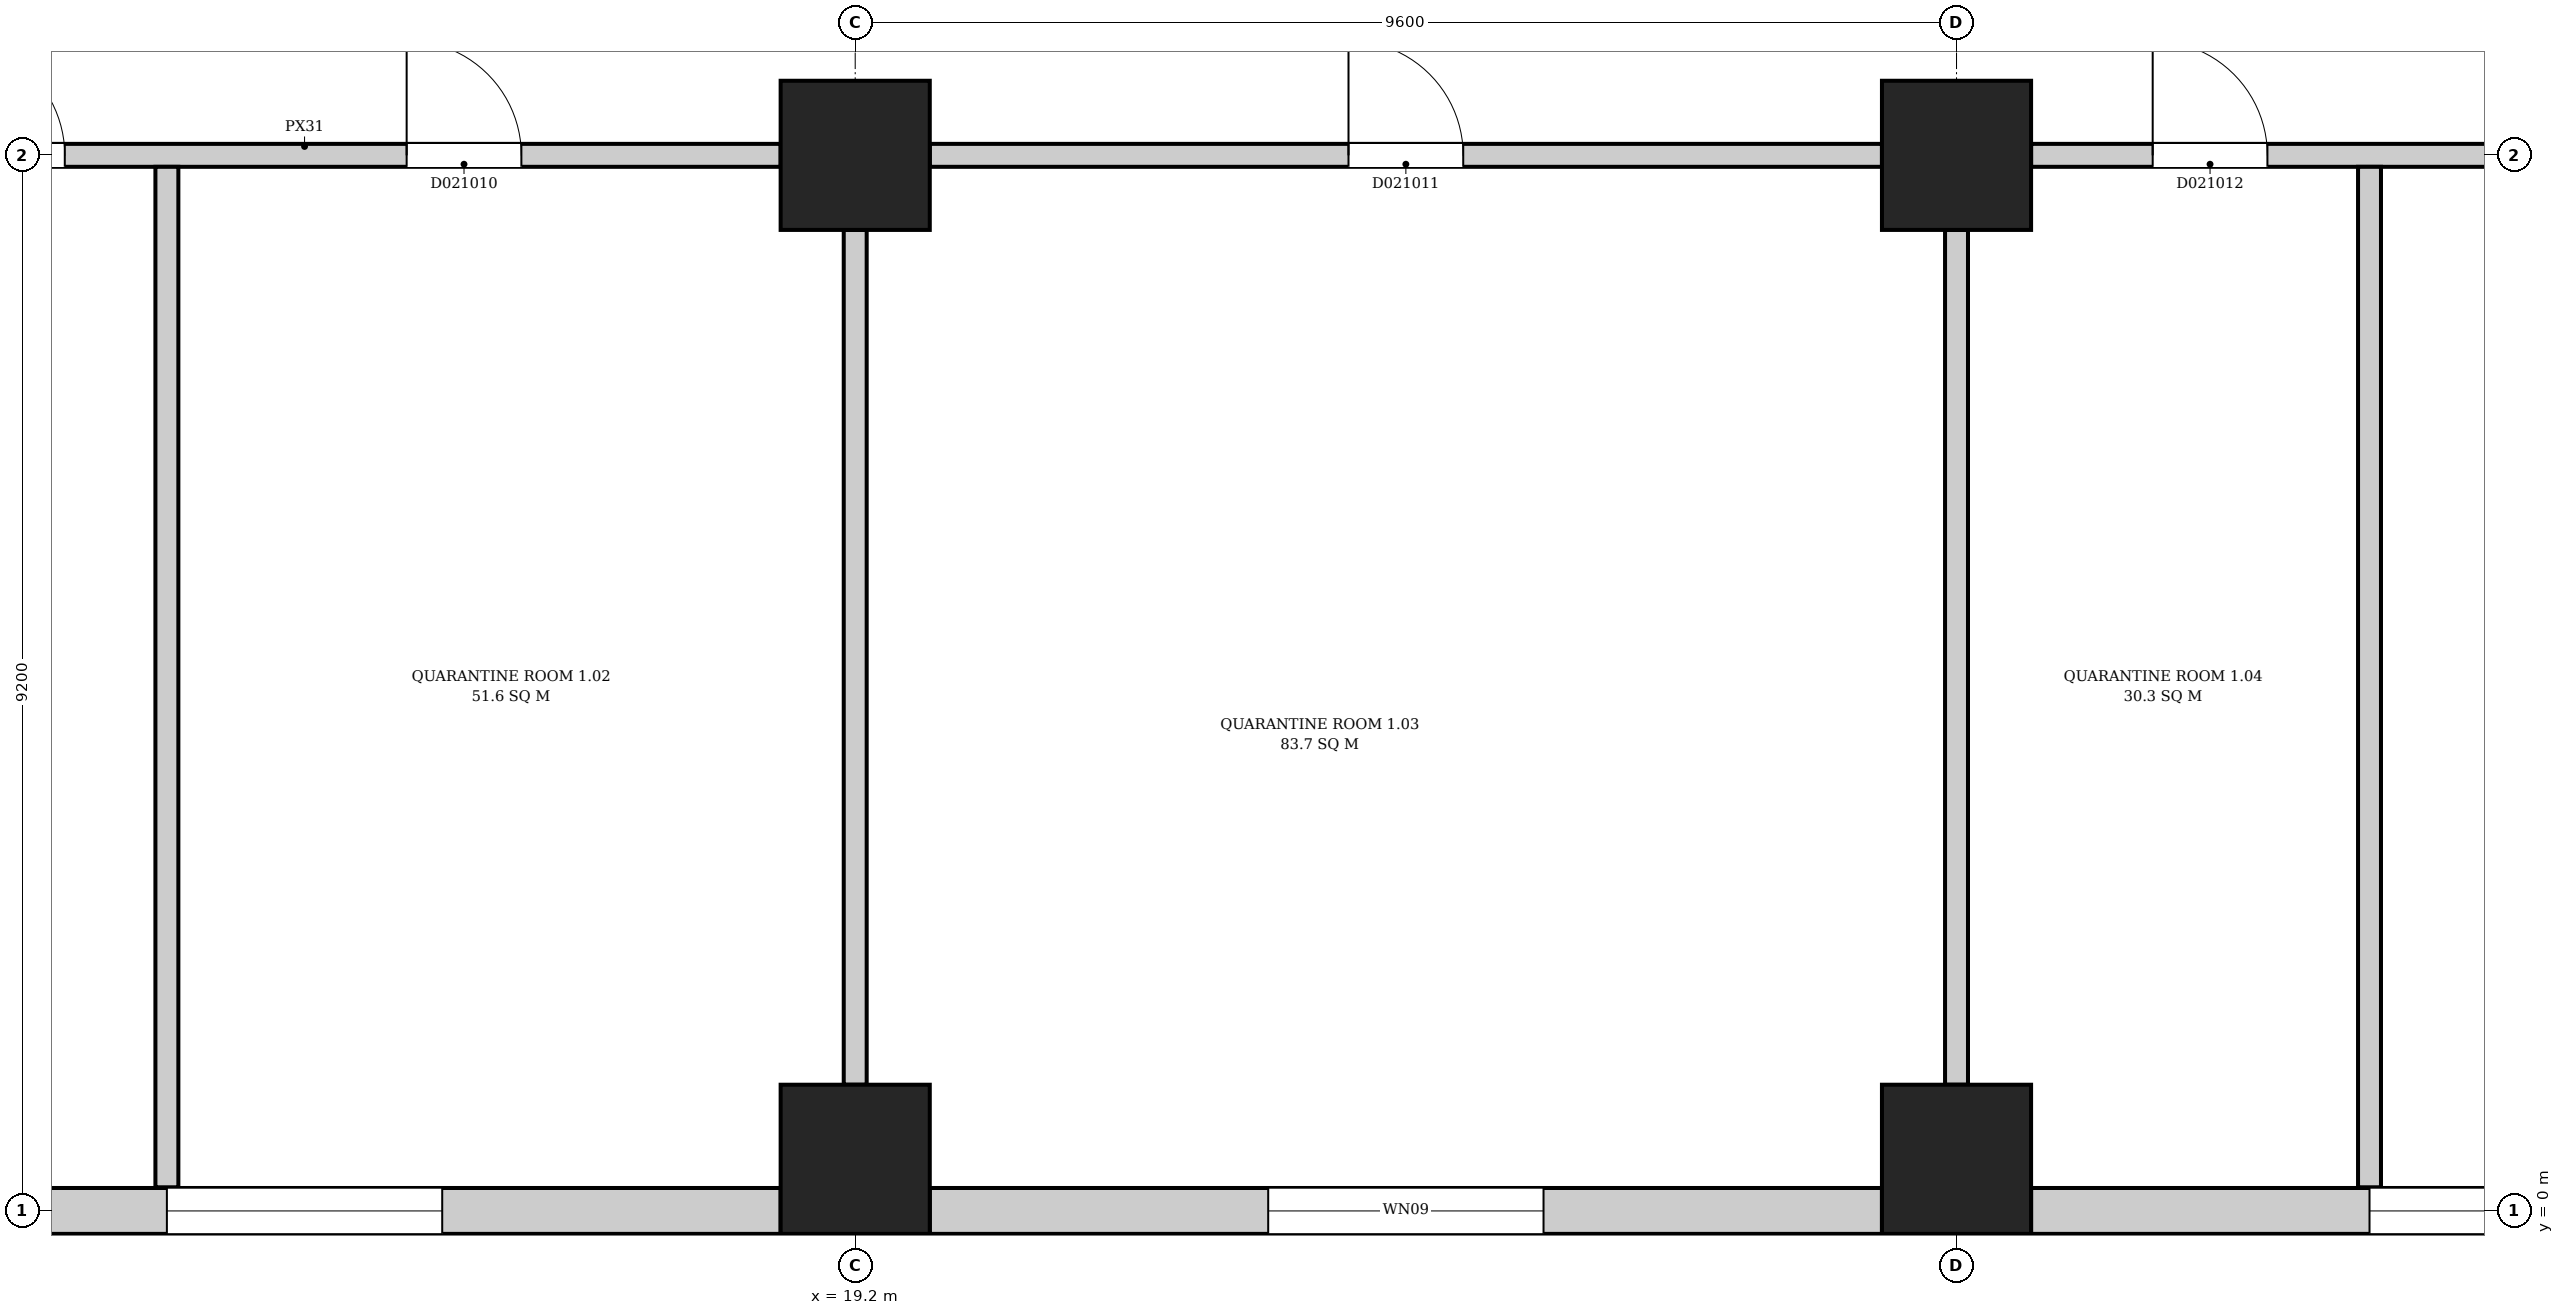
"""IFC4 building model, lengths in metres.
Left out: names, types, materials, properties, quantities, classifications, styles, units other than length and angle.
Written with IfcOpenShell. Run it as: python <this file> out.ifc"""

import sys

from ifc_helpers import new_model, si_unit, direction, frame, frame_2d, origin, origin_2d, place, context, subcontext, project, spatial, rectangle, extrude, element, fill, save


model = new_model("IFC4")
c1 = context("Model", 3, precision=1e-05, world=origin(), true_north=direction((0.0, 1.0)))
c2 = subcontext(c1, "Body", "Model", "MODEL_VIEW")
j1 = project(units=[si_unit("LENGTHUNIT", "METRE"), si_unit("PLANEANGLEUNIT", "RADIAN")], contexts=[c1])
p1 = place(None, origin())
s1 = spatial("IfcSite", under=j1, at=p1, CompositionType="ELEMENT")
p2 = place(p1, origin())
s2 = spatial("IfcBuilding", under=s1, at=p2, CompositionType="ELEMENT")
p3 = place(p2, frame((0.0, 0.0, 6.5)))
s3 = spatial("IfcBuildingStorey", under=s2, at=p3, CompositionType="ELEMENT", Elevation=6.5)
for number, where, z_axis, x_axis in (
    (1, (19.2, 0.45, 0.0), (0.0, 0.0, 1.0), (1.0, 0.0, 0.0)),
    (2, (28.8, 0.45, 0.0), (0.0, 0.0, 1.0), (1.0, 0.0, 0.0)),
    (3, (19.2, 9.2, 0.0), (0.0, 0.0, 1.0), (1.0, 0.0, 0.0)),
    (4, (28.8, 9.2, 0.0), (0.0, 0.0, 1.0), (1.0, 0.0, 0.0)),
):
    element("IfcColumn", number, at=place(p3, frame(where, z_axis=z_axis, x_axis=x_axis)), inside=s3, PredefinedType="COLUMN", context=c2, shape_type="SweptSolid", body=[
        extrude(rectangle(XDim=1.3, YDim=1.3, at=origin_2d()), origin(), (0.0, 0.0, 1.0), 7.7),
    ])
p4 = place(p3, frame((10.25, 0.0, 0.0), z_axis=(0.0, 0.0, 1.0), x_axis=(1.0, 0.0, 0.0)))
e5 = element("IfcWall", 5, at=p4, inside=s3, PredefinedType="ELEMENTEDWALL", context=c2, shape_type="SweptSolid", body=[
    extrude(rectangle(XDim=8.3, YDim=0.4, at=frame_2d((4.15, 0.0))), origin(), (0.0, 0.0, 1.0), 7.35),
])
p5 = place(p4, frame((2.95, 0.0, 1.0)))
e6 = element("IfcOpeningElement", 6, at=p5, cuts=e5, PredefinedType="OPENING", context=c2, shape_type="SweptSolid", body=[
    extrude(rectangle(XDim=2.4, YDim=2.2, at=frame_2d((1.2, 1.1))), frame((0.0, 0.21, 0.0), z_axis=(0.0, -1.0, 0.0), x_axis=(1.0, 0.0, 0.0)), (0.0, 0.0, 1.0), 0.42),
])
p6 = place(p3, frame((19.85, 0.0, 0.0), z_axis=(0.0, 0.0, 1.0), x_axis=(1.0, 0.0, 0.0)))
e7 = element("IfcWall", 7, at=p6, inside=s3, PredefinedType="ELEMENTEDWALL", context=c2, shape_type="SweptSolid", body=[
    extrude(rectangle(XDim=8.3, YDim=0.4, at=frame_2d((4.15, 0.0))), origin(), (0.0, 0.0, 1.0), 7.35),
])
p7 = place(p6, frame((2.95, 0.0, 1.0)))
e8 = element("IfcOpeningElement", 8, at=p7, cuts=e7, PredefinedType="OPENING", context=c2, shape_type="SweptSolid", body=[
    extrude(rectangle(XDim=2.4, YDim=2.2, at=frame_2d((1.2, 1.1))), frame((0.0, 0.21, 0.0), z_axis=(0.0, -1.0, 0.0), x_axis=(1.0, 0.0, 0.0)), (0.0, 0.0, 1.0), 0.42),
])
p8 = place(p3, frame((29.45, 0.0, 0.0), z_axis=(0.0, 0.0, 1.0), x_axis=(1.0, 0.0, 0.0)))
e9 = element("IfcWall", 9, at=p8, inside=s3, PredefinedType="ELEMENTEDWALL", context=c2, shape_type="SweptSolid", body=[
    extrude(rectangle(XDim=8.3, YDim=0.4, at=frame_2d((4.15, 0.0))), origin(), (0.0, 0.0, 1.0), 7.35),
])
p9 = place(p8, frame((2.95, 0.0, 1.0)))
e10 = element("IfcOpeningElement", 10, at=p9, cuts=e9, PredefinedType="OPENING", context=c2, shape_type="SweptSolid", body=[
    extrude(rectangle(XDim=2.4, YDim=2.2, at=frame_2d((1.2, 1.1))), frame((0.0, 0.21, 0.0), z_axis=(0.0, -1.0, 0.0), x_axis=(1.0, 0.0, 0.0)), (0.0, 0.0, 1.0), 0.42),
])
p10 = place(p3, frame((10.25, 9.2, 0.0), z_axis=(0.0, 0.0, 1.0), x_axis=(1.0, 0.0, 0.0)))
e11 = element("IfcWall", 11, at=p10, inside=s3, PredefinedType="PARTITIONING", context=c2, shape_type="SweptSolid", body=[
    extrude(rectangle(XDim=8.3, YDim=0.2, at=frame_2d((4.15, 0.0))), origin(), (0.0, 0.0, 1.0), 6.95),
])
p11 = place(p10, frame((1.06, 0.0, 0.0)))
e12 = element("IfcOpeningElement", 12, at=p11, cuts=e11, PredefinedType="OPENING", context=c2, shape_type="SweptSolid", body=[
    extrude(rectangle(XDim=1.0, YDim=2.1, at=frame_2d((0.5, 1.05))), frame((0.0, 0.11, 0.0), z_axis=(0.0, -1.0, 0.0), x_axis=(1.0, 0.0, 0.0)), (0.0, 0.0, 1.0), 0.22),
])
p12 = place(p10, frame((5.04, 0.0, 0.0)))
e13 = element("IfcOpeningElement", 13, at=p12, cuts=e11, PredefinedType="OPENING", context=c2, shape_type="SweptSolid", body=[
    extrude(rectangle(XDim=1.0, YDim=2.1, at=frame_2d((0.5, 1.05))), frame((0.0, 0.11, 0.0), z_axis=(0.0, -1.0, 0.0), x_axis=(1.0, 0.0, 0.0)), (0.0, 0.0, 1.0), 0.22),
])
p13 = place(p3, frame((13.2, 0.206, 0.0), z_axis=(0.0, 0.0, 1.0), x_axis=(0.0, 1.0, 0.0)))
e14 = element("IfcWall", 14, at=p13, inside=s3, PredefinedType="PARTITIONING", context=c2, shape_type="SweptSolid", body=[
    extrude(rectangle(XDim=8.894, YDim=0.2, at=frame_2d((4.447, 0.0))), origin(), (0.0, 0.0, 1.0), 7.35),
])
p14 = place(p3, frame((19.2, 1.1, 0.0), z_axis=(0.0, 0.0, 1.0), x_axis=(0.0, 1.0, 0.0)))
e15 = element("IfcWall", 15, at=p14, inside=s3, PredefinedType="PARTITIONING", context=c2, shape_type="SweptSolid", body=[
    extrude(rectangle(XDim=7.45, YDim=0.2, at=frame_2d((3.725, 0.0))), origin(), (0.0, 0.0, 1.0), 6.95),
])
p15 = place(p3, frame((19.85, 9.2, 0.0), z_axis=(0.0, 0.0, 1.0), x_axis=(1.0, 0.0, 0.0)))
e16 = element("IfcWall", 16, at=p15, inside=s3, PredefinedType="PARTITIONING", context=c2, shape_type="SweptSolid", body=[
    extrude(rectangle(XDim=8.3, YDim=0.2, at=frame_2d((4.15, 0.0))), origin(), (0.0, 0.0, 1.0), 6.95),
])
p16 = place(p15, frame((3.65, 0.0, 0.0)))
e17 = element("IfcOpeningElement", 17, at=p16, cuts=e16, PredefinedType="OPENING", context=c2, shape_type="SweptSolid", body=[
    extrude(rectangle(XDim=1.0, YDim=2.1, at=frame_2d((0.5, 1.05))), frame((0.0, 0.11, 0.0), z_axis=(0.0, -1.0, 0.0), x_axis=(1.0, 0.0, 0.0)), (0.0, 0.0, 1.0), 0.22),
])
p17 = place(p3, frame((28.8, 1.1, 0.0), z_axis=(0.0, 0.0, 1.0), x_axis=(0.0, 1.0, 0.0)))
e18 = element("IfcWall", 18, at=p17, inside=s3, PredefinedType="PARTITIONING", context=c2, shape_type="SweptSolid", body=[
    extrude(rectangle(XDim=7.45, YDim=0.2, at=frame_2d((3.725, 0.0))), origin(), (0.0, 0.0, 1.0), 6.95),
])
p18 = place(p3, frame((29.45, 9.2, 0.0), z_axis=(0.0, 0.0, 1.0), x_axis=(1.0, 0.0, 0.0)))
e19 = element("IfcWall", 19, at=p18, inside=s3, PredefinedType="PARTITIONING", context=c2, shape_type="SweptSolid", body=[
    extrude(rectangle(XDim=8.3, YDim=0.2, at=frame_2d((4.15, 0.0))), origin(), (0.0, 0.0, 1.0), 6.95),
])
p19 = place(p18, frame((1.06, 0.0, 0.0)))
e20 = element("IfcOpeningElement", 20, at=p19, cuts=e19, PredefinedType="OPENING", context=c2, shape_type="SweptSolid", body=[
    extrude(rectangle(XDim=1.0, YDim=2.1, at=frame_2d((0.5, 1.05))), frame((0.0, 0.11, 0.0), z_axis=(0.0, -1.0, 0.0), x_axis=(1.0, 0.0, 0.0)), (0.0, 0.0, 1.0), 0.22),
])
p20 = place(p18, frame((5.04, 0.0, 0.0)))
e21 = element("IfcOpeningElement", 21, at=p20, cuts=e19, PredefinedType="OPENING", context=c2, shape_type="SweptSolid", body=[
    extrude(rectangle(XDim=1.0, YDim=2.1, at=frame_2d((0.5, 1.05))), frame((0.0, 0.11, 0.0), z_axis=(0.0, -1.0, 0.0), x_axis=(1.0, 0.0, 0.0)), (0.0, 0.0, 1.0), 0.22),
])
p21 = place(p3, frame((32.4, 0.206, 0.0), z_axis=(0.0, 0.0, 1.0), x_axis=(0.0, 1.0, 0.0)))
e22 = element("IfcWall", 22, at=p21, inside=s3, PredefinedType="PARTITIONING", context=c2, shape_type="SweptSolid", body=[
    extrude(rectangle(XDim=8.894, YDim=0.2, at=frame_2d((4.447, 0.0))), origin(), (0.0, 0.0, 1.0), 7.35),
])
p22 = place(p5, origin())
e23 = element("IfcWindow", 23, at=p22, inside=s3, PartitioningType="SINGLE_PANEL", PredefinedType="WINDOW", context=c2, shape_type="SweptSolid", body=[
    extrude(rectangle(XDim=2.4, YDim=2.2, at=frame_2d((1.2, 1.1))), frame((0.0, 0.03, 0.0), z_axis=(0.0, -1.0, 0.0), x_axis=(1.0, 0.0, 0.0)), (0.0, 0.0, 1.0), 0.06),
])
fill(e6, e23)
p23 = place(p7, origin())
e24 = element("IfcWindow", 24, at=p23, inside=s3, PartitioningType="SINGLE_PANEL", PredefinedType="WINDOW", context=c2, shape_type="SweptSolid", body=[
    extrude(rectangle(XDim=2.4, YDim=2.2, at=frame_2d((1.2, 1.1))), frame((0.0, 0.03, 0.0), z_axis=(0.0, -1.0, 0.0), x_axis=(1.0, 0.0, 0.0)), (0.0, 0.0, 1.0), 0.06),
])
fill(e8, e24)
p24 = place(p9, origin())
e25 = element("IfcWindow", 25, at=p24, inside=s3, PartitioningType="SINGLE_PANEL", PredefinedType="WINDOW", context=c2, shape_type="SweptSolid", body=[
    extrude(rectangle(XDim=2.4, YDim=2.2, at=frame_2d((1.2, 1.1))), frame((0.0, 0.03, 0.0), z_axis=(0.0, -1.0, 0.0), x_axis=(1.0, 0.0, 0.0)), (0.0, 0.0, 1.0), 0.06),
])
fill(e10, e25)
p25 = place(p11, origin())
e26 = element("IfcDoor", 26, at=p25, inside=s3, OperationType="SINGLE_SWING_LEFT", PredefinedType="DOOR", context=c2, shape_type="SweptSolid", body=[
    extrude(rectangle(XDim=1.0, YDim=2.1, at=frame_2d((0.5, 1.05))), frame((0.0, 0.025, 0.0), z_axis=(0.0, -1.0, 0.0), x_axis=(1.0, 0.0, 0.0)), (0.0, 0.0, 1.0), 0.05),
])
fill(e12, e26)
p26 = place(p12, origin())
e27 = element("IfcDoor", 27, at=p26, inside=s3, OperationType="SINGLE_SWING_RIGHT", PredefinedType="DOOR", context=c2, shape_type="SweptSolid", body=[
    extrude(rectangle(XDim=1.0, YDim=2.1, at=frame_2d((0.5, 1.05))), frame((0.0, 0.025, 0.0), z_axis=(0.0, -1.0, 0.0), x_axis=(1.0, 0.0, 0.0)), (0.0, 0.0, 1.0), 0.05),
])
fill(e13, e27)
p27 = place(p16, origin())
e28 = element("IfcDoor", 28, at=p27, inside=s3, OperationType="SINGLE_SWING_LEFT", PredefinedType="DOOR", context=c2, shape_type="SweptSolid", body=[
    extrude(rectangle(XDim=1.0, YDim=2.1, at=frame_2d((0.5, 1.05))), frame((0.0, 0.025, 0.0), z_axis=(0.0, -1.0, 0.0), x_axis=(1.0, 0.0, 0.0)), (0.0, 0.0, 1.0), 0.05),
])
fill(e17, e28)
p28 = place(p19, origin())
e29 = element("IfcDoor", 29, at=p28, inside=s3, OperationType="SINGLE_SWING_LEFT", PredefinedType="DOOR", context=c2, shape_type="SweptSolid", body=[
    extrude(rectangle(XDim=1.0, YDim=2.1, at=frame_2d((0.5, 1.05))), frame((0.0, 0.025, 0.0), z_axis=(0.0, -1.0, 0.0), x_axis=(1.0, 0.0, 0.0)), (0.0, 0.0, 1.0), 0.05),
])
fill(e20, e29)
save(model, sys.argv[1])
